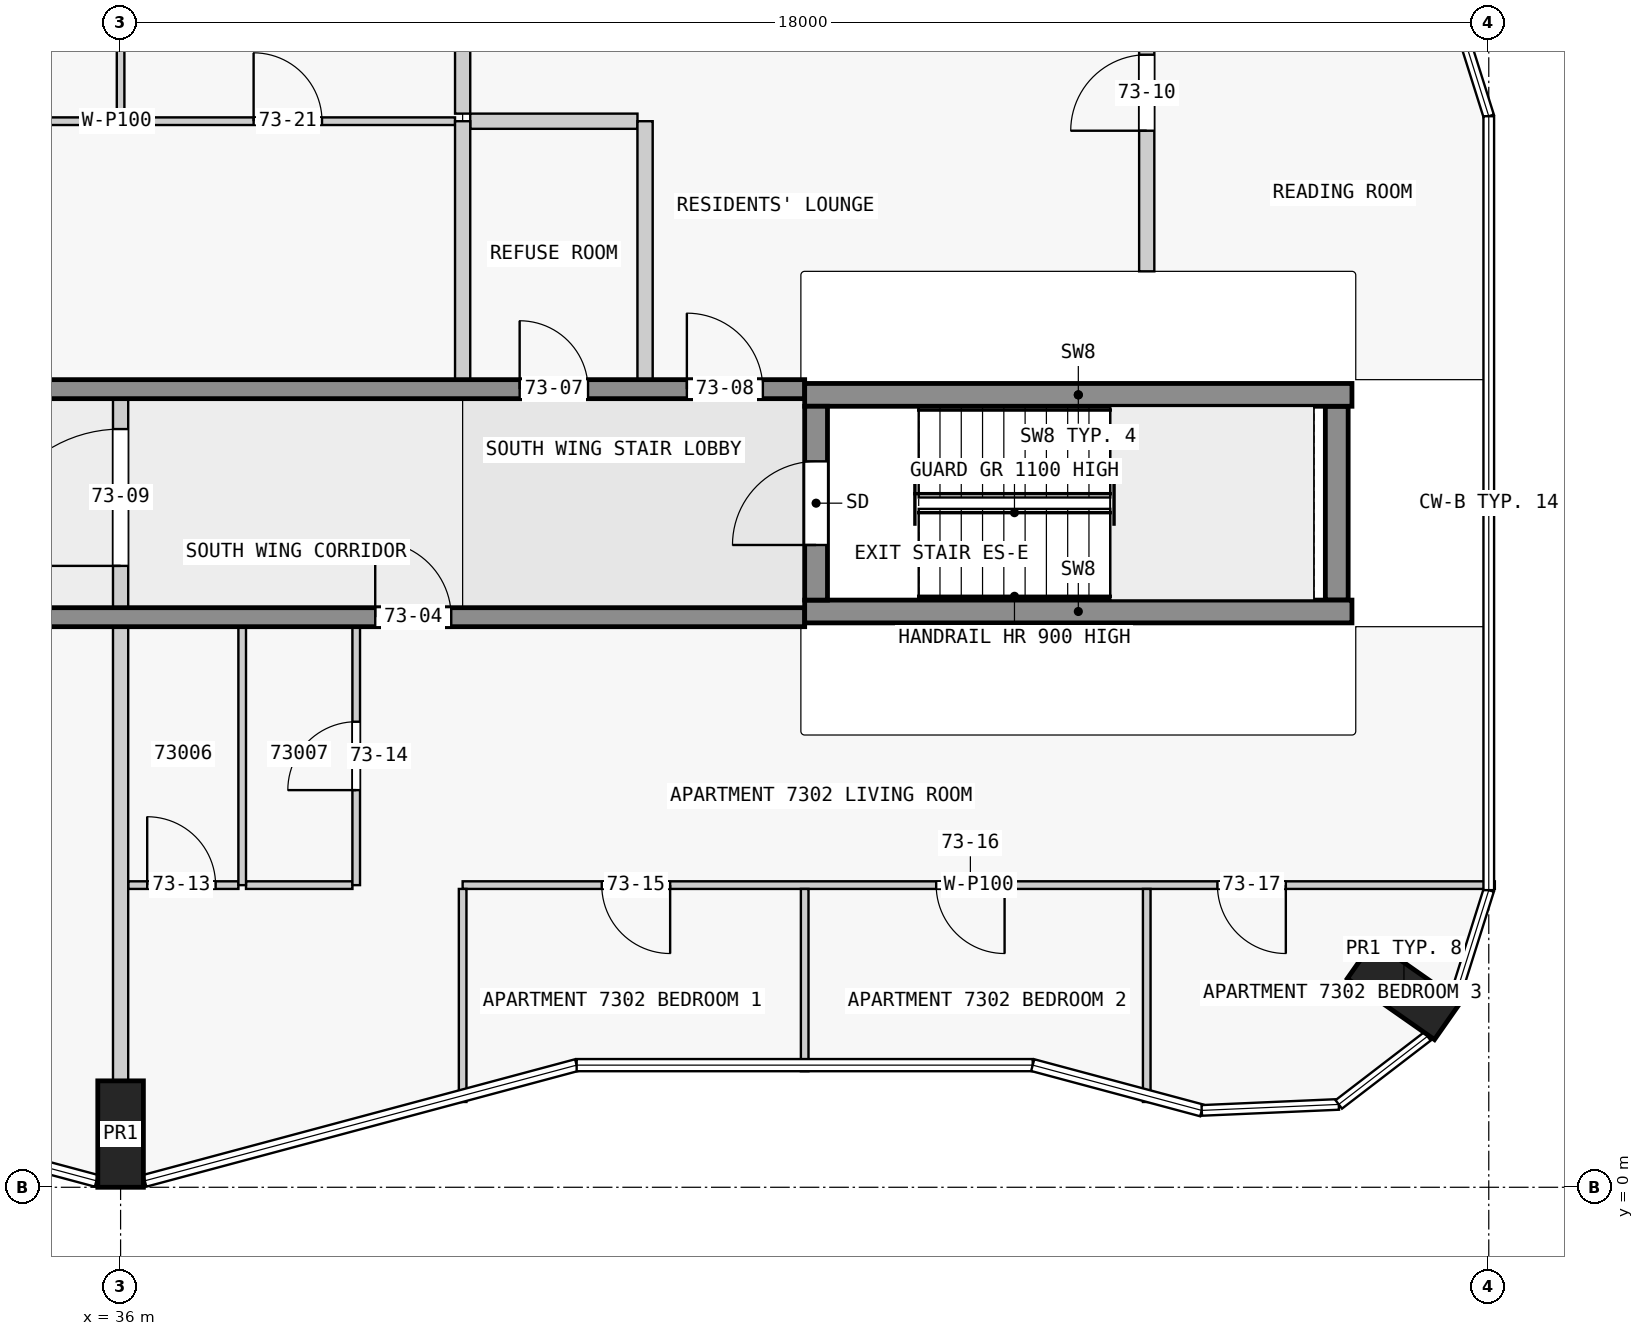
"""IFC4 building model, lengths in metres.
Left out: names, types, materials, properties, quantities, classifications, styles, units other than length and angle.
Written with IfcOpenShell. Run it as: python <this file> out.ifc"""

import sys

from ifc_helpers import new_model, si_unit, direction, frame, frame_2d, origin, origin_2d, place, context, subcontext, project, spatial, rectangle, extrude, element, fill, save


model = new_model("IFC4")
c1 = context("Model", 3, precision=1e-05, world=origin(), true_north=direction((0.0, 1.0)))
c2 = subcontext(c1, "Body", "Model", "MODEL_VIEW")
j1 = project(units=[si_unit("LENGTHUNIT", "METRE"), si_unit("PLANEANGLEUNIT", "RADIAN")], contexts=[c1])
p1 = place(None, origin())
s1 = spatial("IfcSite", under=j1, at=p1, CompositionType="ELEMENT")
p2 = place(p1, origin())
s2 = spatial("IfcBuilding", under=s1, at=p2, CompositionType="ELEMENT")
p3 = place(p2, frame((0.0, 0.0, 277.4)))
s3 = spatial("IfcBuildingStorey", under=s2, at=p3, CompositionType="ELEMENT", Elevation=277.4)
for number, where, z_axis, x_axis in (
    (1, (36.0, 0.7, 0.0), (0.0, 0.0, 1.0), (1.0, 0.0, 0.0)),
    (2, (52.884, 2.59, 0.0), (0.0, 0.0, 1.0), (0.574, 0.819, 0.0)),
):
    element("IfcColumn", number, at=place(p3, frame(where, z_axis=z_axis, x_axis=x_axis)), inside=s3, PredefinedType="COLUMN", context=c2, shape_type="SweptSolid", body=[
        extrude(rectangle(XDim=0.6, YDim=1.4, at=origin_2d()), origin(), (0.0, 0.0, 1.0), 3.5),
    ])
p4 = place(p3, frame((45.15, 7.725, 0.0), z_axis=(0.0, 0.0, 1.0), x_axis=(0.0, 1.0, 0.0)))
e3 = element("IfcWall", 3, at=p4, inside=s3, PredefinedType="SHEAR", context=c2, shape_type="SweptSolid", body=[
    extrude(rectangle(XDim=2.55, YDim=0.3, at=frame_2d((1.275, 0.0))), origin(), (0.0, 0.0, 1.0), 3.5),
])
p5 = place(p4, frame((0.725, 0.0, 0.0)))
e4 = element("IfcOpeningElement", 4, at=p5, cuts=e3, PredefinedType="OPENING", context=c2, shape_type="SweptSolid", body=[
    extrude(rectangle(XDim=1.1, YDim=2.1, at=frame_2d((0.55, 1.05))), frame((0.0, 0.16, 0.0), z_axis=(0.0, -1.0, 0.0), x_axis=(1.0, 0.0, 0.0)), (0.0, 0.0, 1.0), 0.32),
])
p6 = place(p3, frame((52.0, 7.725, 0.0), z_axis=(0.0, 0.0, 1.0), x_axis=(0.0, 1.0, 0.0)))
e5 = element("IfcWall", 5, at=p6, inside=s3, PredefinedType="SHEAR", context=c2, shape_type="SweptSolid", body=[
    extrude(rectangle(XDim=2.55, YDim=0.3, at=frame_2d((1.275, 0.0))), origin(), (0.0, 0.0, 1.0), 3.5),
])
for number, where, z_axis, x_axis in (
    (6, (45.0, 7.575, 0.0), (0.0, 0.0, 1.0), (1.0, 0.0, 0.0)),
    (7, (45.0, 10.425, 0.0), (0.0, 0.0, 1.0), (1.0, 0.0, 0.0)),
):
    element("IfcWall", number, at=place(p3, frame(where, z_axis=z_axis, x_axis=x_axis)), inside=s3, PredefinedType="SHEAR", context=c2, shape_type="SweptSolid", body=[
        extrude(rectangle(XDim=7.2, YDim=0.3, at=frame_2d((3.6, 0.0))), origin(), (0.0, 0.0, 1.0), 3.5),
    ])
p7 = place(p3, frame((22.5, 7.5, 0.0), z_axis=(0.0, 0.0, 1.0), x_axis=(1.0, 0.0, 0.0)))
e8 = element("IfcWall", 8, at=p7, inside=s3, PredefinedType="SHEAR", context=c2, shape_type="SweptSolid", body=[
    extrude(rectangle(XDim=22.5, YDim=0.25, at=frame_2d((11.25, 0.0))), origin(), (0.0, 0.0, 1.0), 3.25),
])
p8 = place(p7, frame((1.85, 0.0, 0.0)))
e9 = element("IfcOpeningElement", 9, at=p8, cuts=e8, PredefinedType="OPENING", context=c2, shape_type="SweptSolid", body=[
    extrude(rectangle(XDim=0.9, YDim=2.1, at=frame_2d((0.45, 1.05))), frame((0.0, 0.135, 0.0), z_axis=(0.0, -1.0, 0.0), x_axis=(1.0, 0.0, 0.0)), (0.0, 0.0, 1.0), 0.27),
])
p9 = place(p7, frame((6.25, 0.0, 0.0)))
e10 = element("IfcOpeningElement", 10, at=p9, cuts=e8, PredefinedType="OPENING", context=c2, shape_type="SweptSolid", body=[
    extrude(rectangle(XDim=1.0, YDim=2.1, at=frame_2d((0.5, 1.05))), frame((0.0, 0.135, 0.0), z_axis=(0.0, -1.0, 0.0), x_axis=(1.0, 0.0, 0.0)), (0.0, 0.0, 1.0), 0.27),
])
p10 = place(p7, frame((10.35, 0.0, 0.0)))
e11 = element("IfcOpeningElement", 11, at=p10, cuts=e8, PredefinedType="OPENING", context=c2, shape_type="SweptSolid", body=[
    extrude(rectangle(XDim=1.8, YDim=2.1, at=frame_2d((0.9, 1.05))), frame((0.0, 0.135, 0.0), z_axis=(0.0, -1.0, 0.0), x_axis=(1.0, 0.0, 0.0)), (0.0, 0.0, 1.0), 0.27),
])
p11 = place(p7, frame((16.85, 0.0, 0.0)))
e12 = element("IfcOpeningElement", 12, at=p11, cuts=e8, PredefinedType="OPENING", context=c2, shape_type="SweptSolid", body=[
    extrude(rectangle(XDim=1.0, YDim=2.1, at=frame_2d((0.5, 1.05))), frame((0.0, 0.135, 0.0), z_axis=(0.0, -1.0, 0.0), x_axis=(1.0, 0.0, 0.0)), (0.0, 0.0, 1.0), 0.27),
])
p12 = place(p3, frame((22.5, 10.5, 0.0), z_axis=(0.0, 0.0, 1.0), x_axis=(1.0, 0.0, 0.0)))
e13 = element("IfcWall", 13, at=p12, inside=s3, PredefinedType="SHEAR", context=c2, shape_type="SweptSolid", body=[
    extrude(rectangle(XDim=22.5, YDim=0.25, at=frame_2d((11.25, 0.0))), origin(), (0.0, 0.0, 1.0), 3.25),
])
p13 = place(p12, frame((1.85, 0.0, 0.0)))
e14 = element("IfcOpeningElement", 14, at=p13, cuts=e13, PredefinedType="OPENING", context=c2, shape_type="SweptSolid", body=[
    extrude(rectangle(XDim=0.9, YDim=2.1, at=frame_2d((0.45, 1.05))), frame((0.0, 0.135, 0.0), z_axis=(0.0, -1.0, 0.0), x_axis=(1.0, 0.0, 0.0)), (0.0, 0.0, 1.0), 0.27),
])
p14 = place(p12, frame((10.05, 0.0, 0.0)))
e15 = element("IfcOpeningElement", 15, at=p14, cuts=e13, PredefinedType="OPENING", context=c2, shape_type="SweptSolid", body=[
    extrude(rectangle(XDim=1.0, YDim=2.1, at=frame_2d((0.5, 1.05))), frame((0.0, 0.135, 0.0), z_axis=(0.0, -1.0, 0.0), x_axis=(1.0, 0.0, 0.0)), (0.0, 0.0, 1.0), 0.27),
])
p15 = place(p12, frame((18.75, 0.0, 0.0)))
e16 = element("IfcOpeningElement", 16, at=p15, cuts=e13, PredefinedType="OPENING", context=c2, shape_type="SweptSolid", body=[
    extrude(rectangle(XDim=0.9, YDim=2.1, at=frame_2d((0.45, 1.05))), frame((0.0, 0.135, 0.0), z_axis=(0.0, -1.0, 0.0), x_axis=(1.0, 0.0, 0.0)), (0.0, 0.0, 1.0), 0.27),
])
p16 = place(p12, frame((20.95, 0.0, 0.0)))
e17 = element("IfcOpeningElement", 17, at=p16, cuts=e13, PredefinedType="OPENING", context=c2, shape_type="SweptSolid", body=[
    extrude(rectangle(XDim=1.0, YDim=2.1, at=frame_2d((0.5, 1.05))), frame((0.0, 0.135, 0.0), z_axis=(0.0, -1.0, 0.0), x_axis=(1.0, 0.0, 0.0)), (0.0, 0.0, 1.0), 0.27),
])
p17 = place(p3, frame((54.08, 3.975, 0.0), z_axis=(0.0, 0.0, 1.0), x_axis=(-1.0, 0.0, 0.0)))
e18 = element("IfcWall", 18, at=p17, inside=s3, PredefinedType="PARTITIONING", context=c2, shape_type="SweptSolid", body=[
    extrude(rectangle(XDim=13.58, YDim=0.1, at=frame_2d((6.79, 0.0))), origin(), (0.0, 0.0, 1.0), 3.25),
])
p18 = place(p17, frame((10.85, 0.0, 0.0)))
e19 = element("IfcOpeningElement", 19, at=p18, cuts=e18, PredefinedType="OPENING", context=c2, shape_type="SweptSolid", body=[
    extrude(rectangle(XDim=0.9, YDim=2.1, at=frame_2d((0.45, 1.05))), frame((0.0, 0.06, 0.0), z_axis=(0.0, -1.0, 0.0), x_axis=(1.0, 0.0, 0.0)), (0.0, 0.0, 1.0), 0.12),
])
p19 = place(p17, frame((6.45, 0.0, 0.0)))
e20 = element("IfcOpeningElement", 20, at=p19, cuts=e18, PredefinedType="OPENING", context=c2, shape_type="SweptSolid", body=[
    extrude(rectangle(XDim=0.9, YDim=2.1, at=frame_2d((0.45, 1.05))), frame((0.0, 0.06, 0.0), z_axis=(0.0, -1.0, 0.0), x_axis=(1.0, 0.0, 0.0)), (0.0, 0.0, 1.0), 0.12),
])
p20 = place(p17, frame((2.75, 0.0, 0.0)))
e21 = element("IfcOpeningElement", 21, at=p20, cuts=e18, PredefinedType="OPENING", context=c2, shape_type="SweptSolid", body=[
    extrude(rectangle(XDim=0.9, YDim=2.1, at=frame_2d((0.45, 1.05))), frame((0.0, 0.06, 0.0), z_axis=(0.0, -1.0, 0.0), x_axis=(1.0, 0.0, 0.0)), (0.0, 0.0, 1.0), 0.12),
])
p21 = place(p3, frame((36.1, 3.975, 0.0), z_axis=(0.0, 0.0, 1.0), x_axis=(1.0, 0.0, 0.0)))
e22 = element("IfcWall", 22, at=p21, inside=s3, PredefinedType="PARTITIONING", context=c2, shape_type="SweptSolid", body=[
    extrude(rectangle(XDim=1.45, YDim=0.1, at=frame_2d((0.725, 0.0))), origin(), (0.0, 0.0, 1.0), 3.25),
])
p22 = place(p21, frame((0.25, 0.0, 0.0)))
e23 = element("IfcOpeningElement", 23, at=p22, cuts=e22, PredefinedType="OPENING", context=c2, shape_type="SweptSolid", body=[
    extrude(rectangle(XDim=0.9, YDim=2.1, at=frame_2d((0.45, 1.05))), frame((0.0, 0.06, 0.0), z_axis=(0.0, -1.0, 0.0), x_axis=(1.0, 0.0, 0.0)), (0.0, 0.0, 1.0), 0.12),
])
p23 = place(p3, frame((37.65, 3.975, 0.0), z_axis=(0.0, 0.0, 1.0), x_axis=(1.0, 0.0, 0.0)))
e24 = element("IfcWall", 24, at=p23, inside=s3, PredefinedType="PARTITIONING", context=c2, shape_type="SweptSolid", body=[
    extrude(rectangle(XDim=1.4, YDim=0.1, at=frame_2d((0.7, 0.0))), origin(), (0.0, 0.0, 1.0), 3.25),
])
p24 = place(p3, frame((31.5, 14.025, 0.0), z_axis=(0.0, 0.0, 1.0), x_axis=(1.0, 0.0, 0.0)))
e25 = element("IfcWall", 25, at=p24, inside=s3, PredefinedType="PARTITIONING", context=c2, shape_type="SweptSolid", body=[
    extrude(rectangle(XDim=8.9, YDim=0.1, at=frame_2d((4.45, 0.0))), origin(), (0.0, 0.0, 1.0), 3.25),
])
p25 = place(p24, frame((1.85, 0.0, 0.0)))
e26 = element("IfcOpeningElement", 26, at=p25, cuts=e25, PredefinedType="OPENING", context=c2, shape_type="SweptSolid", body=[
    extrude(rectangle(XDim=0.9, YDim=2.1, at=frame_2d((0.45, 1.05))), frame((0.0, 0.06, 0.0), z_axis=(0.0, -1.0, 0.0), x_axis=(1.0, 0.0, 0.0)), (0.0, 0.0, 1.0), 0.12),
])
p26 = place(p24, frame((6.25, 0.0, 0.0)))
e27 = element("IfcOpeningElement", 27, at=p26, cuts=e25, PredefinedType="OPENING", context=c2, shape_type="SweptSolid", body=[
    extrude(rectangle(XDim=0.9, YDim=2.1, at=frame_2d((0.45, 1.05))), frame((0.0, 0.06, 0.0), z_axis=(0.0, -1.0, 0.0), x_axis=(1.0, 0.0, 0.0)), (0.0, 0.0, 1.0), 0.12),
])
p27 = place(p3, frame((42.8, 14.025, 0.0), z_axis=(0.0, 0.0, 1.0), x_axis=(-1.0, 0.0, 0.0)))
e28 = element("IfcWall", 28, at=p27, inside=s3, PredefinedType="PARTITIONING", context=c2, shape_type="SweptSolid", body=[
    extrude(rectangle(XDim=2.2, YDim=0.2, at=frame_2d((1.1, 0.0))), origin(), (0.0, 0.0, 1.0), 3.25),
])
p28 = place(p3, frame((36.0, 14.075, 0.0), z_axis=(0.0, 0.0, 1.0), x_axis=(0.0, 1.0, 0.0)))
e29 = element("IfcWall", 29, at=p28, inside=s3, PredefinedType="PARTITIONING", context=c2, shape_type="SweptSolid", body=[
    extrude(rectangle(XDim=2.525, YDim=0.1, at=frame_2d((1.263, 0.0))), origin(), (0.0, 0.0, 1.0), 3.25),
])
p29 = place(p3, frame((36.0, 1.4, 0.0), z_axis=(0.0, 0.0, 1.0), x_axis=(0.0, 1.0, 0.0)))
e30 = element("IfcWall", 30, at=p29, inside=s3, PredefinedType="PARTITIONING", context=c2, shape_type="SweptSolid", body=[
    extrude(rectangle(XDim=5.975, YDim=0.2, at=frame_2d((2.988, 0.0))), origin(), (0.0, 0.0, 1.0), 3.25),
])
p30 = place(p3, frame((37.6, 3.975, 0.0), z_axis=(0.0, 0.0, 1.0), x_axis=(0.0, 1.0, 0.0)))
e31 = element("IfcWall", 31, at=p30, inside=s3, PredefinedType="PARTITIONING", context=c2, shape_type="SweptSolid", body=[
    extrude(rectangle(XDim=3.4, YDim=0.1, at=frame_2d((1.7, 0.0))), origin(), (0.0, 0.0, 1.0), 3.25),
])
p31 = place(p3, frame((39.1, 3.975, 0.0), z_axis=(0.0, 0.0, 1.0), x_axis=(0.0, 1.0, 0.0)))
e32 = element("IfcWall", 32, at=p31, inside=s3, PredefinedType="PARTITIONING", context=c2, shape_type="SweptSolid", body=[
    extrude(rectangle(XDim=3.4, YDim=0.1, at=frame_2d((1.7, 0.0))), origin(), (0.0, 0.0, 1.0), 3.25),
])
p32 = place(p31, frame((1.25, 0.0, 0.0)))
e33 = element("IfcOpeningElement", 33, at=p32, cuts=e32, PredefinedType="OPENING", context=c2, shape_type="SweptSolid", body=[
    extrude(rectangle(XDim=0.9, YDim=2.1, at=frame_2d((0.45, 1.05))), frame((0.0, 0.06, 0.0), z_axis=(0.0, -1.0, 0.0), x_axis=(1.0, 0.0, 0.0)), (0.0, 0.0, 1.0), 0.12),
])
p33 = place(p3, frame((40.5, 3.925, 0.0), z_axis=(0.0, 0.0, 1.0), x_axis=(0.0, -1.0, 0.0)))
e34 = element("IfcWall", 34, at=p33, inside=s3, PredefinedType="PARTITIONING", context=c2, shape_type="SweptSolid", body=[
    extrude(rectangle(XDim=2.803, YDim=0.1, at=frame_2d((1.401, 0.0))), origin(), (0.0, 0.0, 1.0), 3.25),
])
p34 = place(p3, frame((40.5, 14.025, 0.0), z_axis=(0.0, 0.0, 1.0), x_axis=(0.0, -1.0, 0.0)))
e35 = element("IfcWall", 35, at=p34, inside=s3, PredefinedType="PARTITIONING", context=c2, shape_type="SweptSolid", body=[
    extrude(rectangle(XDim=3.4, YDim=0.2, at=frame_2d((1.7, 0.0))), origin(), (0.0, 0.0, 1.0), 3.25),
])
p35 = place(p3, frame((40.5, 14.125, 0.0), z_axis=(0.0, 0.0, 1.0), x_axis=(0.0, 1.0, 0.0)))
e36 = element("IfcWall", 36, at=p35, inside=s3, PredefinedType="PARTITIONING", context=c2, shape_type="SweptSolid", body=[
    extrude(rectangle(XDim=2.753, YDim=0.2, at=frame_2d((1.376, 0.0))), origin(), (0.0, 0.0, 1.0), 3.25),
])
p36 = place(p3, frame((42.9, 10.625, 0.0), z_axis=(0.0, 0.0, 1.0), x_axis=(0.0, 1.0, 0.0)))
e37 = element("IfcWall", 37, at=p36, inside=s3, PredefinedType="PARTITIONING", context=c2, shape_type="SweptSolid", body=[
    extrude(rectangle(XDim=3.4, YDim=0.2, at=frame_2d((1.7, 0.0))), origin(), (0.0, 0.0, 1.0), 3.25),
])
p37 = place(p3, frame((45.0, 1.527, 0.0), z_axis=(0.0, 0.0, 1.0), x_axis=(0.0, 1.0, 0.0)))
e38 = element("IfcWall", 38, at=p37, inside=s3, PredefinedType="PARTITIONING", context=c2, shape_type="SweptSolid", body=[
    extrude(rectangle(XDim=2.398, YDim=0.1, at=frame_2d((1.199, 0.0))), origin(), (0.0, 0.0, 1.0), 3.25),
])
p38 = place(p3, frame((49.5, 1.122, 0.0), z_axis=(0.0, 0.0, 1.0), x_axis=(0.0, 1.0, 0.0)))
e39 = element("IfcWall", 39, at=p38, inside=s3, PredefinedType="PARTITIONING", context=c2, shape_type="SweptSolid", body=[
    extrude(rectangle(XDim=2.803, YDim=0.1, at=frame_2d((1.401, 0.0))), origin(), (0.0, 0.0, 1.0), 3.25),
])
p39 = place(p3, frame((49.5, 12.05, 0.0), z_axis=(0.0, 0.0, 1.0), x_axis=(0.0, 1.0, 0.0)))
e40 = element("IfcWall", 40, at=p39, inside=s3, PredefinedType="PARTITIONING", context=c2, shape_type="SweptSolid", body=[
    extrude(rectangle(XDim=4.828, YDim=0.2, at=frame_2d((2.414, 0.0))), origin(), (0.0, 0.0, 1.0), 3.25),
])
p40 = place(p39, frame((1.85, 0.0, 0.0)))
e41 = element("IfcOpeningElement", 41, at=p40, cuts=e40, PredefinedType="OPENING", context=c2, shape_type="SweptSolid", body=[
    extrude(rectangle(XDim=1.0, YDim=2.1, at=frame_2d((0.5, 1.05))), frame((0.0, 0.11, 0.0), z_axis=(0.0, -1.0, 0.0), x_axis=(1.0, 0.0, 0.0)), (0.0, 0.0, 1.0), 0.22),
])
p41 = place(p3, frame((36.0, 7.475, 0.0), z_axis=(0.0, 0.0, 1.0), x_axis=(0.0, 1.0, 0.0)))
e42 = element("IfcWall", 42, at=p41, inside=s3, PredefinedType="PARTITIONING", context=c2, shape_type="SweptSolid", body=[
    extrude(rectangle(XDim=3.15, YDim=0.2, at=frame_2d((1.575, 0.0))), origin(), (0.0, 0.0, 1.0), 3.25),
])
p42 = place(p41, frame((0.7, 0.0, 0.0)))
e43 = element("IfcOpeningElement", 43, at=p42, cuts=e42, PredefinedType="OPENING", context=c2, shape_type="SweptSolid", body=[
    extrude(rectangle(XDim=1.8, YDim=2.1, at=frame_2d((0.9, 1.05))), frame((0.0, 0.11, 0.0), z_axis=(0.0, -1.0, 0.0), x_axis=(1.0, 0.0, 0.0)), (0.0, 0.0, 1.0), 0.22),
])
p43 = place(p5, origin())
e44 = element("IfcDoor", 44, at=p43, inside=s3, OperationType="SINGLE_SWING_LEFT", PredefinedType="DOOR", context=c2, shape_type="SweptSolid", body=[
    extrude(rectangle(XDim=1.1, YDim=2.1, at=frame_2d((0.55, 1.05))), frame((0.0, 0.025, 0.0), z_axis=(0.0, -1.0, 0.0), x_axis=(1.0, 0.0, 0.0)), (0.0, 0.0, 1.0), 0.05),
])
fill(e4, e44)
p44 = place(p11, origin())
e45 = element("IfcDoor", 45, at=p44, inside=s3, OperationType="SINGLE_SWING_RIGHT", PredefinedType="DOOR", context=c2, shape_type="SweptSolid", body=[
    extrude(rectangle(XDim=1.0, YDim=2.1, at=frame_2d((0.5, 1.05))), frame((0.0, 0.025, 0.0), z_axis=(0.0, -1.0, 0.0), x_axis=(1.0, 0.0, 0.0)), (0.0, 0.0, 1.0), 0.05),
])
fill(e12, e45)
p45 = place(p15, origin())
e46 = element("IfcDoor", 46, at=p45, inside=s3, OperationType="SINGLE_SWING_RIGHT", PredefinedType="DOOR", context=c2, shape_type="SweptSolid", body=[
    extrude(rectangle(XDim=0.9, YDim=2.1, at=frame_2d((0.45, 1.05))), frame((0.0, 0.025, 0.0), z_axis=(0.0, -1.0, 0.0), x_axis=(1.0, 0.0, 0.0)), (0.0, 0.0, 1.0), 0.05),
])
fill(e16, e46)
p46 = place(p16, origin())
e47 = element("IfcDoor", 47, at=p46, inside=s3, OperationType="SINGLE_SWING_RIGHT", PredefinedType="DOOR", context=c2, shape_type="SweptSolid", body=[
    extrude(rectangle(XDim=1.0, YDim=2.1, at=frame_2d((0.5, 1.05))), frame((0.0, 0.025, 0.0), z_axis=(0.0, -1.0, 0.0), x_axis=(1.0, 0.0, 0.0)), (0.0, 0.0, 1.0), 0.05),
])
fill(e17, e47)
p47 = place(p42, origin())
e48 = element("IfcDoor", 48, at=p47, inside=s3, OperationType="SINGLE_SWING_RIGHT", PredefinedType="DOOR", context=c2, shape_type="SweptSolid", body=[
    extrude(rectangle(XDim=1.8, YDim=2.1, at=frame_2d((0.9, 1.05))), frame((0.0, 0.025, 0.0), z_axis=(0.0, -1.0, 0.0), x_axis=(1.0, 0.0, 0.0)), (0.0, 0.0, 1.0), 0.05),
])
fill(e43, e48)
p48 = place(p40, origin())
e49 = element("IfcDoor", 49, at=p48, inside=s3, OperationType="SINGLE_SWING_LEFT", PredefinedType="DOOR", context=c2, shape_type="SweptSolid", body=[
    extrude(rectangle(XDim=1.0, YDim=2.1, at=frame_2d((0.5, 1.05))), frame((0.0, 0.025, 0.0), z_axis=(0.0, -1.0, 0.0), x_axis=(1.0, 0.0, 0.0)), (0.0, 0.0, 1.0), 0.05),
])
fill(e41, e49)
p49 = place(p22, origin())
e50 = element("IfcDoor", 50, at=p49, inside=s3, OperationType="SINGLE_SWING_LEFT", PredefinedType="DOOR", context=c2, shape_type="SweptSolid", body=[
    extrude(rectangle(XDim=0.9, YDim=2.1, at=frame_2d((0.45, 1.05))), frame((0.0, 0.025, 0.0), z_axis=(0.0, -1.0, 0.0), x_axis=(1.0, 0.0, 0.0)), (0.0, 0.0, 1.0), 0.05),
])
fill(e23, e50)
p50 = place(p32, origin())
e51 = element("IfcDoor", 51, at=p50, inside=s3, OperationType="SINGLE_SWING_LEFT", PredefinedType="DOOR", context=c2, shape_type="SweptSolid", body=[
    extrude(rectangle(XDim=0.9, YDim=2.1, at=frame_2d((0.45, 1.05))), frame((0.0, 0.025, 0.0), z_axis=(0.0, -1.0, 0.0), x_axis=(1.0, 0.0, 0.0)), (0.0, 0.0, 1.0), 0.05),
])
fill(e33, e51)
p51 = place(p18, origin())
e52 = element("IfcDoor", 52, at=p51, inside=s3, OperationType="SINGLE_SWING_RIGHT", PredefinedType="DOOR", context=c2, shape_type="SweptSolid", body=[
    extrude(rectangle(XDim=0.9, YDim=2.1, at=frame_2d((0.45, 1.05))), frame((0.0, 0.025, 0.0), z_axis=(0.0, -1.0, 0.0), x_axis=(1.0, 0.0, 0.0)), (0.0, 0.0, 1.0), 0.05),
])
fill(e19, e52)
p52 = place(p19, origin())
e53 = element("IfcDoor", 53, at=p52, inside=s3, OperationType="SINGLE_SWING_RIGHT", PredefinedType="DOOR", context=c2, shape_type="SweptSolid", body=[
    extrude(rectangle(XDim=0.9, YDim=2.1, at=frame_2d((0.45, 1.05))), frame((0.0, 0.025, 0.0), z_axis=(0.0, -1.0, 0.0), x_axis=(1.0, 0.0, 0.0)), (0.0, 0.0, 1.0), 0.05),
])
fill(e20, e53)
p53 = place(p20, origin())
e54 = element("IfcDoor", 54, at=p53, inside=s3, OperationType="SINGLE_SWING_LEFT", PredefinedType="DOOR", context=c2, shape_type="SweptSolid", body=[
    extrude(rectangle(XDim=0.9, YDim=2.1, at=frame_2d((0.45, 1.05))), frame((0.0, 0.025, 0.0), z_axis=(0.0, -1.0, 0.0), x_axis=(1.0, 0.0, 0.0)), (0.0, 0.0, 1.0), 0.05),
])
fill(e21, e54)
p54 = place(p26, origin())
e55 = element("IfcDoor", 55, at=p54, inside=s3, OperationType="SINGLE_SWING_RIGHT", PredefinedType="DOOR", context=c2, shape_type="SweptSolid", body=[
    extrude(rectangle(XDim=0.9, YDim=2.1, at=frame_2d((0.45, 1.05))), frame((0.0, 0.025, 0.0), z_axis=(0.0, -1.0, 0.0), x_axis=(1.0, 0.0, 0.0)), (0.0, 0.0, 1.0), 0.05),
])
fill(e27, e55)
save(model, sys.argv[1])
